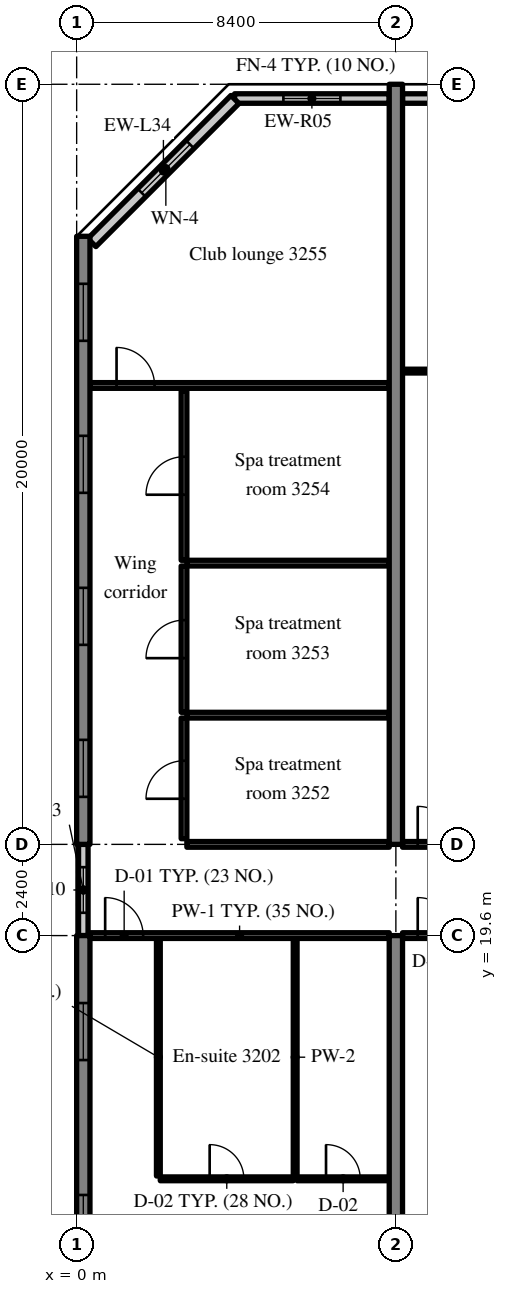
"""IFC4 building model, lengths in metres.
Left out: names, types, materials, properties, quantities, classifications, styles, units other than length and angle.
Written with IfcOpenShell. Run it as: python <this file> out.ifc"""

import sys

from ifc_helpers import new_model, si_unit, direction, frame, frame_2d, origin, place, context, subcontext, project, spatial, rectangle, extrude, source, transform, mapped, element, fill, save


model = new_model("IFC4")
c1 = context("Model", 3, precision=1e-05, world=origin(), true_north=direction((0.0, 1.0)))
c2 = subcontext(c1, "Body", "Model", "MODEL_VIEW")
j1 = project(units=[si_unit("LENGTHUNIT", "METRE"), si_unit("PLANEANGLEUNIT", "RADIAN")], contexts=[c1])
p1 = place(None, origin())
s1 = spatial("IfcSite", under=j1, at=p1, CompositionType="ELEMENT")
p2 = place(p1, origin())
s2 = spatial("IfcBuilding", under=s1, at=p2, CompositionType="ELEMENT")
p3 = place(p2, frame((0.0, 0.0, 133.2)))
s3 = spatial("IfcBuildingStorey", under=s2, at=p3, CompositionType="ELEMENT", Elevation=133.2)
m1 = source(origin(), c2, "Body", "SweptSolid", [
    extrude(rectangle(XDim=10.1, YDim=0.35, at=frame_2d((5.05, 0.0))), origin(), (0.0, 0.0, 1.0), 3.52),
])
p4 = place(p3, frame((0.175, 9.5, 0.0), z_axis=(0.0, 0.0, 1.0), x_axis=(0.0, 1.0, 0.0)))
e1 = element("IfcWall", 1, at=p4, inside=s3, PredefinedType="SHEAR", context=c2, shape_type="MappedRepresentation", body=[
    mapped(m1, transform((0.0, 0.0, 0.0), scale=1.0)),
])
m2 = source(origin(), c2, "Body", "SweptSolid", [
    extrude(rectangle(XDim=1.5, YDim=1.5, at=frame_2d((0.75, 0.75))), frame((0.0, 0.185, 0.0), z_axis=(0.0, -1.0, 0.0), x_axis=(1.0, 0.0, 0.0)), (0.0, 0.0, 1.0), 0.37),
])
p5 = place(p4, frame((1.775, 0.0, 0.9)))
e2 = element("IfcOpeningElement", 2, at=p5, cuts=e1, PredefinedType="OPENING", context=c2, shape_type="MappedRepresentation", body=[
    mapped(m2, transform((0.0, 0.0, 0.0), scale=1.0)),
])
p6 = place(p4, frame((6.825, 0.0, 0.9)))
e3 = element("IfcOpeningElement", 3, at=p6, cuts=e1, PredefinedType="OPENING", context=c2, shape_type="MappedRepresentation", body=[
    mapped(m2, transform((0.0, 0.0, 0.0), scale=1.0)),
])
m3 = source(origin(), c2, "Body", "SweptSolid", [
    extrude(rectangle(XDim=16.0, YDim=0.35, at=frame_2d((8.0, 0.0))), origin(), (0.0, 0.0, 1.0), 3.52),
])
p7 = place(p3, frame((0.175, 22.0, 0.0), z_axis=(0.0, 0.0, 1.0), x_axis=(0.0, 1.0, 0.0)))
e4 = element("IfcWall", 4, at=p7, inside=s3, PredefinedType="SHEAR", context=c2, shape_type="MappedRepresentation", body=[
    mapped(m3, transform((0.0, 0.0, 0.0), scale=1.0)),
])
p8 = place(p7, frame((1.25, 0.0, 0.9)))
e5 = element("IfcOpeningElement", 5, at=p8, cuts=e4, PredefinedType="OPENING", context=c2, shape_type="MappedRepresentation", body=[
    mapped(m2, transform((0.0, 0.0, 0.0), scale=1.0)),
])
p9 = place(p7, frame((5.25, 0.0, 0.9)))
e6 = element("IfcOpeningElement", 6, at=p9, cuts=e4, PredefinedType="OPENING", context=c2, shape_type="MappedRepresentation", body=[
    mapped(m2, transform((0.0, 0.0, 0.0), scale=1.0)),
])
p10 = place(p7, frame((9.25, 0.0, 0.9)))
e7 = element("IfcOpeningElement", 7, at=p10, cuts=e4, PredefinedType="OPENING", context=c2, shape_type="MappedRepresentation", body=[
    mapped(m2, transform((0.0, 0.0, 0.0), scale=1.0)),
])
p11 = place(p7, frame((13.25, 0.0, 0.9)))
e8 = element("IfcOpeningElement", 8, at=p11, cuts=e4, PredefinedType="OPENING", context=c2, shape_type="MappedRepresentation", body=[
    mapped(m2, transform((0.0, 0.0, 0.0), scale=1.0)),
])
m4 = source(origin(), c2, "Body", "SweptSolid", [
    extrude(rectangle(XDim=14.1, YDim=0.35, at=frame_2d((7.05, 0.0))), origin(), (0.0, 0.0, 1.0), 3.52),
])
p12 = place(p3, frame((8.4, 5.5, 0.0), z_axis=(0.0, 0.0, 1.0), x_axis=(0.0, 1.0, 0.0)))
e9 = element("IfcWall", 9, at=p12, inside=s3, PredefinedType="SHEAR", context=c2, shape_type="MappedRepresentation", body=[
    mapped(m4, transform((0.0, 0.0, 0.0), scale=1.0)),
])
m5 = source(origin(), c2, "Body", "SweptSolid", [
    extrude(rectangle(XDim=20.0, YDim=0.35, at=frame_2d((10.0, 0.0))), origin(), (0.0, 0.0, 1.0), 3.52),
])
p13 = place(p3, frame((8.4, 22.0, 0.0), z_axis=(0.0, 0.0, 1.0), x_axis=(0.0, 1.0, 0.0)))
e10 = element("IfcWall", 10, at=p13, inside=s3, PredefinedType="SHEAR", context=c2, shape_type="MappedRepresentation", body=[
    mapped(m5, transform((0.0, 0.0, 0.0), scale=1.0)),
])
m6 = source(origin(), c2, "Body", "SweptSolid", [
    extrude(rectangle(XDim=4.07, YDim=0.25, at=frame_2d((2.035, 0.0))), origin(), (0.0, 0.0, 1.0), 2.82),
])
p14 = place(p3, frame((8.225, 41.625, 0.0), z_axis=(0.0, 0.0, 1.0), x_axis=(-1.0, 0.0, 0.0)))
e11 = element("IfcWall", 11, at=p14, inside=s3, PredefinedType="SOLIDWALL", context=c2, shape_type="MappedRepresentation", body=[
    mapped(m6, transform((0.0, 0.0, 0.0), scale=1.0)),
])
m7 = source(origin(), c2, "Body", "SweptSolid", [
    extrude(rectangle(XDim=1.5, YDim=1.5, at=frame_2d((0.75, 0.75))), frame((0.0, 0.135, 0.0), z_axis=(0.0, -1.0, 0.0), x_axis=(1.0, 0.0, 0.0)), (0.0, 0.0, 1.0), 0.27),
])
p15 = place(p14, frame((1.285, 0.0, 0.9)))
e12 = element("IfcOpeningElement", 12, at=p15, cuts=e11, PredefinedType="OPENING", context=c2, shape_type="MappedRepresentation", body=[
    mapped(m7, transform((0.0, 0.0, 0.0), scale=1.0)),
])
m8 = source(origin(), c2, "Body", "SweptSolid", [
    extrude(rectangle(XDim=3.675, YDim=0.25, at=frame_2d((1.837, 0.0))), origin(), (0.0, 0.0, 1.0), 2.82),
])
p16 = place(p3, frame((12.25, 41.625, 0.0), z_axis=(0.0, 0.0, 1.0), x_axis=(-1.0, 0.0, 0.0)))
e13 = element("IfcWall", 13, at=p16, inside=s3, PredefinedType="SOLIDWALL", context=c2, shape_type="MappedRepresentation", body=[
    mapped(m8, transform((0.0, 0.0, 0.0), scale=1.0)),
])
p17 = place(p16, frame((1.087, 0.0, 0.9)))
e14 = element("IfcOpeningElement", 14, at=p17, cuts=e13, PredefinedType="OPENING", context=c2, shape_type="MappedRepresentation", body=[
    mapped(m7, transform((0.0, 0.0, 0.0), scale=1.0)),
])
m9 = source(origin(), c2, "Body", "SweptSolid", [
    extrude(rectangle(XDim=5.326, YDim=0.3, at=frame_2d((2.663, 0.0))), origin(), (0.0, 0.0, 1.0), 3.52),
])
p18 = place(p3, frame((4.166, 41.6, 0.0), z_axis=(0.0, 0.0, 1.0), x_axis=(-0.707106781187, -0.707106781187, 0.0)))
e15 = element("IfcWall", 15, at=p18, inside=s3, PredefinedType="SOLIDWALL", context=c2, shape_type="MappedRepresentation", body=[
    mapped(m9, transform((0.0, 0.0, 0.0), scale=1.0)),
])
m10 = source(origin(), c2, "Body", "SweptSolid", [
    extrude(rectangle(XDim=1.8, YDim=1.5, at=frame_2d((0.9, 0.75))), frame((0.0, 0.16, 0.0), z_axis=(0.0, -1.0, 0.0), x_axis=(1.0, 0.0, 0.0)), (0.0, 0.0, 1.0), 0.32),
])
p19 = place(p18, frame((1.672, 0.0, 0.9)))
e16 = element("IfcOpeningElement", 16, at=p19, cuts=e15, PredefinedType="OPENING", context=c2, shape_type="MappedRepresentation", body=[
    mapped(m10, transform((0.0, 0.0, 0.0), scale=1.0)),
])
m11 = source(origin(), c2, "Body", "SweptSolid", [
    extrude(rectangle(XDim=2.4, YDim=0.25, at=frame_2d((1.2, 0.0))), origin(), (0.0, 0.0, 1.0), 2.62),
])
p20 = place(p3, frame((0.175, 19.6, 0.0), z_axis=(0.0, 0.0, 1.0), x_axis=(0.0, 1.0, 0.0)))
e17 = element("IfcWall", 17, at=p20, inside=s3, PredefinedType="SOLIDWALL", context=c2, shape_type="MappedRepresentation", body=[
    mapped(m11, transform((0.0, 0.0, 0.0), scale=1.0)),
])
m12 = source(origin(), c2, "Body", "SweptSolid", [
    extrude(rectangle(XDim=1.2, YDim=1.5, at=frame_2d((0.6, 0.75))), frame((0.0, 0.135, 0.0), z_axis=(0.0, -1.0, 0.0), x_axis=(1.0, 0.0, 0.0)), (0.0, 0.0, 1.0), 0.27),
])
p21 = place(p20, frame((0.6, 0.0, 0.9)))
e18 = element("IfcOpeningElement", 18, at=p21, cuts=e17, PredefinedType="OPENING", context=c2, shape_type="MappedRepresentation", body=[
    mapped(m12, transform((0.0, 0.0, 0.0), scale=1.0)),
])
m13 = source(origin(), c2, "Body", "SweptSolid", [
    extrude(rectangle(XDim=6.25, YDim=0.1, at=frame_2d((3.125, 0.0))), origin(), (0.0, 0.0, 1.0), 3.52),
])
for number, where, z_axis, x_axis in (
    (19, (2.15, 13.275, 0.0), (0.0, 0.0, 1.0), (0.0, 1.0, 0.0)),
    (20, (5.75, 13.275, 0.0), (0.0, 0.0, 1.0), (0.0, 1.0, 0.0)),
):
    element("IfcWall", number, at=place(p3, frame(where, z_axis=z_axis, x_axis=x_axis)), inside=s3, PredefinedType="PARTITIONING", context=c2, shape_type="MappedRepresentation", body=[
        mapped(m13, transform((0.0, 0.0, 0.0), scale=1.0)),
    ])
m14 = source(origin(), c2, "Body", "SweptSolid", [
    extrude(rectangle(XDim=3.5, YDim=0.1, at=frame_2d((1.75, 0.0))), origin(), (0.0, 0.0, 1.0), 3.52),
])
p22 = place(p3, frame((2.2, 13.2, 0.0), z_axis=(0.0, 0.0, 1.0), x_axis=(1.0, 0.0, 0.0)))
e21 = element("IfcWall", 21, at=p22, inside=s3, PredefinedType="PARTITIONING", context=c2, shape_type="MappedRepresentation", body=[
    mapped(m14, transform((0.0, 0.0, 0.0), scale=1.0)),
])
m15 = source(origin(), c2, "Body", "SweptSolid", [
    extrude(rectangle(XDim=0.9, YDim=2.1, at=frame_2d((0.45, 1.05))), frame((0.0, 0.06, 0.0), z_axis=(0.0, -1.0, 0.0), x_axis=(1.0, 0.0, 0.0)), (0.0, 0.0, 1.0), 0.12),
])
p23 = place(p22, frame((1.3, 0.0, 0.0)))
e22 = element("IfcOpeningElement", 22, at=p23, cuts=e21, PredefinedType="OPENING", context=c2, shape_type="MappedRepresentation", body=[
    mapped(m15, transform((0.0, 0.0, 0.0), scale=1.0)),
])
m16 = source(origin(), c2, "Body", "SweptSolid", [
    extrude(rectangle(XDim=2.425, YDim=0.1, at=frame_2d((1.212, 0.0))), origin(), (0.0, 0.0, 1.0), 3.52),
])
p24 = place(p3, frame((5.8, 13.2, 0.0), z_axis=(0.0, 0.0, 1.0), x_axis=(1.0, 0.0, 0.0)))
e23 = element("IfcWall", 23, at=p24, inside=s3, PredefinedType="PARTITIONING", context=c2, shape_type="MappedRepresentation", body=[
    mapped(m16, transform((0.0, 0.0, 0.0), scale=1.0)),
])
p25 = place(p24, frame((0.762, 0.0, 0.0)))
e24 = element("IfcOpeningElement", 24, at=p25, cuts=e23, PredefinedType="OPENING", context=c2, shape_type="MappedRepresentation", body=[
    mapped(m15, transform((0.0, 0.0, 0.0), scale=1.0)),
])
m17 = source(origin(), c2, "Body", "SweptSolid", [
    extrude(rectangle(XDim=7.875, YDim=0.15, at=frame_2d((3.938, 0.0))), origin(), (0.0, 0.0, 1.0), 2.82),
])
p26 = place(p3, frame((0.35, 19.6, 0.0), z_axis=(0.0, 0.0, 1.0), x_axis=(1.0, 0.0, 0.0)))
e25 = element("IfcWall", 25, at=p26, inside=s3, PredefinedType="PARTITIONING", context=c2, shape_type="MappedRepresentation", body=[
    mapped(m17, transform((0.0, 0.0, 0.0), scale=1.0)),
])
m18 = source(origin(), c2, "Body", "SweptSolid", [
    extrude(rectangle(XDim=1.0, YDim=2.1, at=frame_2d((0.5, 1.05))), frame((0.0, 0.085, 0.0), z_axis=(0.0, -1.0, 0.0), x_axis=(1.0, 0.0, 0.0)), (0.0, 0.0, 1.0), 0.17),
])
p27 = place(p26, frame((0.4, 0.0, 0.0)))
e26 = element("IfcOpeningElement", 26, at=p27, cuts=e25, PredefinedType="OPENING", context=c2, shape_type="MappedRepresentation", body=[
    mapped(m18, transform((0.0, 0.0, 0.0), scale=1.0)),
])
m19 = source(origin(), c2, "Body", "SweptSolid", [
    extrude(rectangle(XDim=8.05, YDim=0.15, at=frame_2d((4.025, 0.0))), origin(), (0.0, 0.0, 1.0), 2.82),
])
p28 = place(p3, frame((8.575, 19.6, 0.0), z_axis=(0.0, 0.0, 1.0), x_axis=(1.0, 0.0, 0.0)))
e27 = element("IfcWall", 27, at=p28, inside=s3, PredefinedType="PARTITIONING", context=c2, shape_type="MappedRepresentation", body=[
    mapped(m19, transform((0.0, 0.0, 0.0), scale=1.0)),
])
p29 = place(p28, frame((0.4, 0.0, 0.0)))
e28 = element("IfcOpeningElement", 28, at=p29, cuts=e27, PredefinedType="OPENING", context=c2, shape_type="MappedRepresentation", body=[
    mapped(m18, transform((0.0, 0.0, 0.0), scale=1.0)),
])
m20 = source(origin(), c2, "Body", "SweptSolid", [
    extrude(rectangle(XDim=5.325, YDim=0.15, at=frame_2d((2.663, 0.0))), origin(), (0.0, 0.0, 1.0), 2.82),
])
p30 = place(p3, frame((2.9, 22.0, 0.0), z_axis=(0.0, 0.0, 1.0), x_axis=(1.0, 0.0, 0.0)))
e29 = element("IfcWall", 29, at=p30, inside=s3, PredefinedType="PARTITIONING", context=c2, shape_type="MappedRepresentation", body=[
    mapped(m20, transform((0.0, 0.0, 0.0), scale=1.0)),
])
m21 = source(origin(), c2, "Body", "SweptSolid", [
    extrude(rectangle(XDim=3.175, YDim=0.15, at=frame_2d((1.587, 0.0))), origin(), (0.0, 0.0, 1.0), 3.52),
])
p31 = place(p3, frame((2.825, 22.15, 0.0), z_axis=(0.0, 0.0, 1.0), x_axis=(0.0, 1.0, 0.0)))
e30 = element("IfcWall", 30, at=p31, inside=s3, PredefinedType="PARTITIONING", context=c2, shape_type="MappedRepresentation", body=[
    mapped(m21, transform((0.0, 0.0, 0.0), scale=1.0)),
])
p32 = place(p31, frame((1.05, 0.0, 0.0)))
e31 = element("IfcOpeningElement", 31, at=p32, cuts=e30, PredefinedType="OPENING", context=c2, shape_type="MappedRepresentation", body=[
    mapped(m18, transform((0.0, 0.0, 0.0), scale=1.0)),
])
m22 = source(origin(), c2, "Body", "SweptSolid", [
    extrude(rectangle(XDim=5.325, YDim=0.15, at=frame_2d((2.663, 0.0))), origin(), (0.0, 0.0, 1.0), 3.52),
])
p33 = place(p3, frame((2.9, 25.4, 0.0), z_axis=(0.0, 0.0, 1.0), x_axis=(1.0, 0.0, 0.0)))
e32 = element("IfcWall", 32, at=p33, inside=s3, PredefinedType="PARTITIONING", context=c2, shape_type="MappedRepresentation", body=[
    mapped(m22, transform((0.0, 0.0, 0.0), scale=1.0)),
])
m23 = source(origin(), c2, "Body", "SweptSolid", [
    extrude(rectangle(XDim=3.85, YDim=0.15, at=frame_2d((1.925, 0.0))), origin(), (0.0, 0.0, 1.0), 3.52),
])
p34 = place(p3, frame((2.825, 25.475, 0.0), z_axis=(0.0, 0.0, 1.0), x_axis=(0.0, 1.0, 0.0)))
e33 = element("IfcWall", 33, at=p34, inside=s3, PredefinedType="PARTITIONING", context=c2, shape_type="MappedRepresentation", body=[
    mapped(m23, transform((0.0, 0.0, 0.0), scale=1.0)),
])
p35 = place(p34, frame((1.425, 0.0, 0.0)))
e34 = element("IfcOpeningElement", 34, at=p35, cuts=e33, PredefinedType="OPENING", context=c2, shape_type="MappedRepresentation", body=[
    mapped(m18, transform((0.0, 0.0, 0.0), scale=1.0)),
])
p36 = place(p3, frame((2.9, 29.4, 0.0), z_axis=(0.0, 0.0, 1.0), x_axis=(1.0, 0.0, 0.0)))
e35 = element("IfcWall", 35, at=p36, inside=s3, PredefinedType="PARTITIONING", context=c2, shape_type="MappedRepresentation", body=[
    mapped(m22, transform((0.0, 0.0, 0.0), scale=1.0)),
])
m24 = source(origin(), c2, "Body", "SweptSolid", [
    extrude(rectangle(XDim=4.45, YDim=0.15, at=frame_2d((2.225, 0.0))), origin(), (0.0, 0.0, 1.0), 3.52),
])
p37 = place(p3, frame((2.825, 29.475, 0.0), z_axis=(0.0, 0.0, 1.0), x_axis=(0.0, 1.0, 0.0)))
e36 = element("IfcWall", 36, at=p37, inside=s3, PredefinedType="PARTITIONING", context=c2, shape_type="MappedRepresentation", body=[
    mapped(m24, transform((0.0, 0.0, 0.0), scale=1.0)),
])
p38 = place(p37, frame((1.725, 0.0, 0.0)))
e37 = element("IfcOpeningElement", 37, at=p38, cuts=e36, PredefinedType="OPENING", context=c2, shape_type="MappedRepresentation", body=[
    mapped(m18, transform((0.0, 0.0, 0.0), scale=1.0)),
])
m25 = source(origin(), c2, "Body", "SweptSolid", [
    extrude(rectangle(XDim=7.875, YDim=0.15, at=frame_2d((3.938, 0.0))), origin(), (0.0, 0.0, 1.0), 3.52),
])
p39 = place(p3, frame((0.35, 34.075, 0.0), z_axis=(0.0, 0.0, 1.0), x_axis=(1.0, 0.0, 0.0)))
e38 = element("IfcWall", 38, at=p39, inside=s3, PredefinedType="PARTITIONING", context=c2, shape_type="MappedRepresentation", body=[
    mapped(m25, transform((0.0, 0.0, 0.0), scale=1.0)),
])
p40 = place(p39, frame((0.7, 0.0, 0.0)))
e39 = element("IfcOpeningElement", 39, at=p40, cuts=e38, PredefinedType="OPENING", context=c2, shape_type="MappedRepresentation", body=[
    mapped(m18, transform((0.0, 0.0, 0.0), scale=1.0)),
])
m26 = source(origin(), c2, "Body", "SweptSolid", [
    extrude(rectangle(XDim=8.05, YDim=0.1, at=frame_2d((4.025, 0.0))), origin(), (0.0, 0.0, 1.0), 3.52),
])
p41 = place(p3, frame((8.575, 34.453, 0.0), z_axis=(0.0, 0.0, 1.0), x_axis=(1.0, 0.0, 0.0)))
e40 = element("IfcWall", 40, at=p41, inside=s3, PredefinedType="PARTITIONING", context=c2, shape_type="MappedRepresentation", body=[
    mapped(m26, transform((0.0, 0.0, 0.0), scale=1.0)),
])
m27 = source(origin(), c2, "Body", "SweptSolid", [
    extrude(rectangle(XDim=1.8, YDim=2.1, at=frame_2d((0.9, 1.05))), frame((0.0, 0.06, 0.0), z_axis=(0.0, -1.0, 0.0), x_axis=(1.0, 0.0, 0.0)), (0.0, 0.0, 1.0), 0.12),
])
p42 = place(p41, frame((3.125, 0.0, 0.0)))
e41 = element("IfcOpeningElement", 41, at=p42, cuts=e40, PredefinedType="OPENING", context=c2, shape_type="MappedRepresentation", body=[
    mapped(m27, transform((0.0, 0.0, 0.0), scale=1.0)),
])
p43 = place(p3, frame((8.575, 22.0, 0.0), z_axis=(0.0, 0.0, 1.0), x_axis=(1.0, 0.0, 0.0)))
e42 = element("IfcWall", 42, at=p43, inside=s3, PredefinedType="PARTITIONING", context=c2, shape_type="MappedRepresentation", body=[
    mapped(m19, transform((0.0, 0.0, 0.0), scale=1.0)),
])
p44 = place(p43, frame((0.4, 0.0, 0.0)))
e43 = element("IfcOpeningElement", 43, at=p44, cuts=e42, PredefinedType="OPENING", context=c2, shape_type="MappedRepresentation", body=[
    mapped(m18, transform((0.0, 0.0, 0.0), scale=1.0)),
])
m28 = source(origin(), c2, "Body", "SweptSolid", [
    extrude(rectangle(XDim=1.5, YDim=1.5, at=frame_2d((0.75, 0.75))), frame((0.0, 0.03, 0.0), z_axis=(0.0, -1.0, 0.0), x_axis=(1.0, 0.0, 0.0)), (0.0, 0.0, 1.0), 0.06),
])
p45 = place(p15, origin())
e44 = element("IfcWindow", 44, at=p45, inside=s3, PartitioningType="SINGLE_PANEL", PredefinedType="WINDOW", context=c2, shape_type="MappedRepresentation", body=[
    mapped(m28, transform((0.0, 0.0, 0.0), scale=1.0)),
])
fill(e12, e44)
m29 = source(origin(), c2, "Body", "SweptSolid", [
    extrude(rectangle(XDim=1.8, YDim=1.5, at=frame_2d((0.9, 0.75))), frame((0.0, 0.03, 0.0), z_axis=(0.0, -1.0, 0.0), x_axis=(1.0, 0.0, 0.0)), (0.0, 0.0, 1.0), 0.06),
])
p46 = place(p19, origin())
e45 = element("IfcWindow", 45, at=p46, inside=s3, PartitioningType="SINGLE_PANEL", PredefinedType="WINDOW", context=c2, shape_type="MappedRepresentation", body=[
    mapped(m29, transform((0.0, 0.0, 0.0), scale=1.0)),
])
fill(e16, e45)
p47 = place(p5, origin())
e46 = element("IfcWindow", 46, at=p47, inside=s3, PartitioningType="SINGLE_PANEL", PredefinedType="WINDOW", context=c2, shape_type="MappedRepresentation", body=[
    mapped(m28, transform((0.0, 0.0, 0.0), scale=1.0)),
])
fill(e2, e46)
p48 = place(p6, origin())
e47 = element("IfcWindow", 47, at=p48, inside=s3, PartitioningType="SINGLE_PANEL", PredefinedType="WINDOW", context=c2, shape_type="MappedRepresentation", body=[
    mapped(m28, transform((0.0, 0.0, 0.0), scale=1.0)),
])
fill(e3, e47)
p49 = place(p8, origin())
e48 = element("IfcWindow", 48, at=p49, inside=s3, PartitioningType="SINGLE_PANEL", PredefinedType="WINDOW", context=c2, shape_type="MappedRepresentation", body=[
    mapped(m28, transform((0.0, 0.0, 0.0), scale=1.0)),
])
fill(e5, e48)
p50 = place(p9, origin())
e49 = element("IfcWindow", 49, at=p50, inside=s3, PartitioningType="SINGLE_PANEL", PredefinedType="WINDOW", context=c2, shape_type="MappedRepresentation", body=[
    mapped(m28, transform((0.0, 0.0, 0.0), scale=1.0)),
])
fill(e6, e49)
p51 = place(p10, origin())
e50 = element("IfcWindow", 50, at=p51, inside=s3, PartitioningType="SINGLE_PANEL", PredefinedType="WINDOW", context=c2, shape_type="MappedRepresentation", body=[
    mapped(m28, transform((0.0, 0.0, 0.0), scale=1.0)),
])
fill(e7, e50)
p52 = place(p11, origin())
e51 = element("IfcWindow", 51, at=p52, inside=s3, PartitioningType="SINGLE_PANEL", PredefinedType="WINDOW", context=c2, shape_type="MappedRepresentation", body=[
    mapped(m28, transform((0.0, 0.0, 0.0), scale=1.0)),
])
fill(e8, e51)
m30 = source(origin(), c2, "Body", "SweptSolid", [
    extrude(rectangle(XDim=1.2, YDim=1.5, at=frame_2d((0.6, 0.75))), frame((0.0, 0.03, 0.0), z_axis=(0.0, -1.0, 0.0), x_axis=(1.0, 0.0, 0.0)), (0.0, 0.0, 1.0), 0.06),
])
p53 = place(p21, origin())
e52 = element("IfcWindow", 52, at=p53, inside=s3, PartitioningType="SINGLE_PANEL", PredefinedType="WINDOW", context=c2, shape_type="MappedRepresentation", body=[
    mapped(m30, transform((0.0, 0.0, 0.0), scale=1.0)),
])
fill(e18, e52)
m31 = source(origin(), c2, "Body", "SweptSolid", [
    extrude(rectangle(XDim=0.9, YDim=2.1, at=frame_2d((0.45, 1.05))), frame((0.0, 0.025, 0.0), z_axis=(0.0, -1.0, 0.0), x_axis=(1.0, 0.0, 0.0)), (0.0, 0.0, 1.0), 0.05),
])
p54 = place(p23, origin())
e53 = element("IfcDoor", 53, at=p54, inside=s3, OperationType="SINGLE_SWING_LEFT", PredefinedType="DOOR", context=c2, shape_type="MappedRepresentation", body=[
    mapped(m31, transform((0.0, 0.0, 0.0), scale=1.0)),
])
fill(e22, e53)
p55 = place(p25, origin())
e54 = element("IfcDoor", 54, at=p55, inside=s3, OperationType="SINGLE_SWING_LEFT", PredefinedType="DOOR", context=c2, shape_type="MappedRepresentation", body=[
    mapped(m31, transform((0.0, 0.0, 0.0), scale=1.0)),
])
fill(e24, e54)
m32 = source(origin(), c2, "Body", "SweptSolid", [
    extrude(rectangle(XDim=1.0, YDim=2.1, at=frame_2d((0.5, 1.05))), frame((0.0, 0.025, 0.0), z_axis=(0.0, -1.0, 0.0), x_axis=(1.0, 0.0, 0.0)), (0.0, 0.0, 1.0), 0.05),
])
p56 = place(p27, origin())
e55 = element("IfcDoor", 55, at=p56, inside=s3, OperationType="SINGLE_SWING_LEFT", PredefinedType="DOOR", context=c2, shape_type="MappedRepresentation", body=[
    mapped(m32, transform((0.0, 0.0, 0.0), scale=1.0)),
])
fill(e26, e55)
p57 = place(p29, origin())
e56 = element("IfcDoor", 56, at=p57, inside=s3, OperationType="SINGLE_SWING_LEFT", PredefinedType="DOOR", context=c2, shape_type="MappedRepresentation", body=[
    mapped(m32, transform((0.0, 0.0, 0.0), scale=1.0)),
])
fill(e28, e56)
p58 = place(p32, origin())
e57 = element("IfcDoor", 57, at=p58, inside=s3, OperationType="SINGLE_SWING_LEFT", PredefinedType="DOOR", context=c2, shape_type="MappedRepresentation", body=[
    mapped(m32, transform((0.0, 0.0, 0.0), scale=1.0)),
])
fill(e31, e57)
p59 = place(p35, origin())
e58 = element("IfcDoor", 58, at=p59, inside=s3, OperationType="SINGLE_SWING_LEFT", PredefinedType="DOOR", context=c2, shape_type="MappedRepresentation", body=[
    mapped(m32, transform((0.0, 0.0, 0.0), scale=1.0)),
])
fill(e34, e58)
p60 = place(p38, origin())
e59 = element("IfcDoor", 59, at=p60, inside=s3, OperationType="SINGLE_SWING_LEFT", PredefinedType="DOOR", context=c2, shape_type="MappedRepresentation", body=[
    mapped(m32, transform((0.0, 0.0, 0.0), scale=1.0)),
])
fill(e37, e59)
p61 = place(p40, origin())
e60 = element("IfcDoor", 60, at=p61, inside=s3, OperationType="SINGLE_SWING_LEFT", PredefinedType="DOOR", context=c2, shape_type="MappedRepresentation", body=[
    mapped(m32, transform((0.0, 0.0, 0.0), scale=1.0)),
])
fill(e39, e60)
p62 = place(p44, origin())
e61 = element("IfcDoor", 61, at=p62, inside=s3, OperationType="SINGLE_SWING_LEFT", PredefinedType="DOOR", context=c2, shape_type="MappedRepresentation", body=[
    mapped(m32, transform((0.0, 0.0, 0.0), scale=1.0)),
])
fill(e43, e61)
save(model, sys.argv[1])
